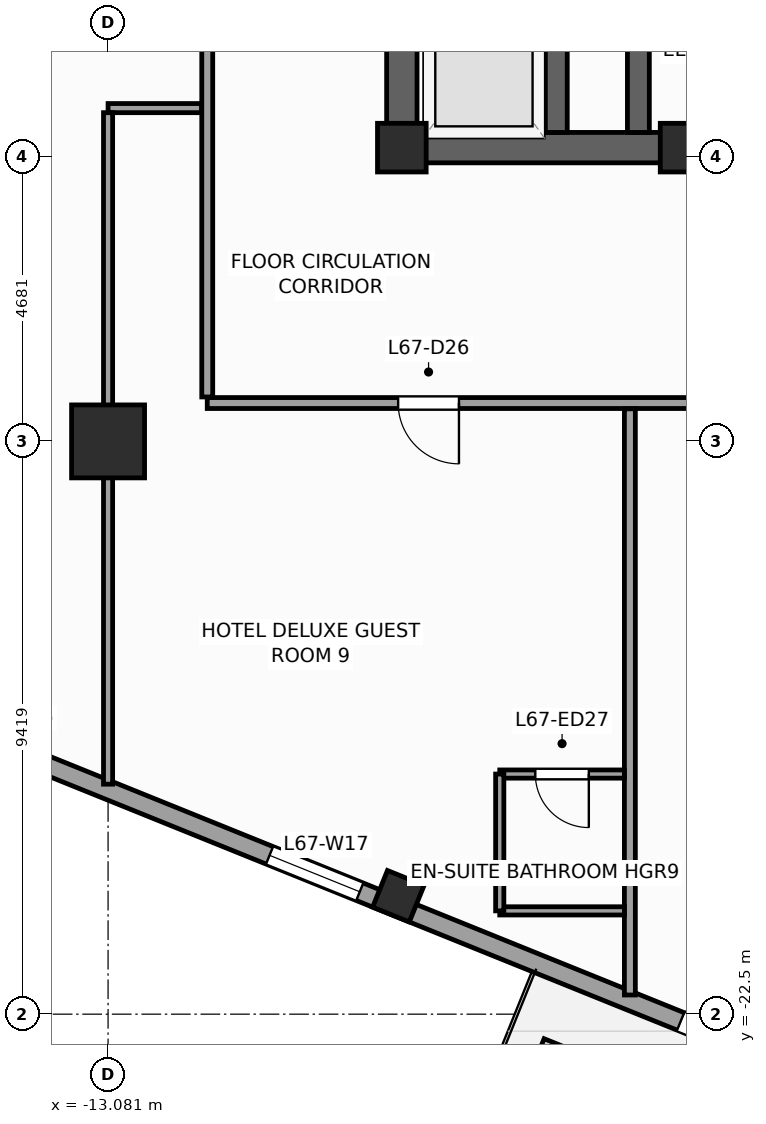
"""IFC4 building model, lengths in metres.
Left out: names, types, materials, properties, quantities, classifications, styles, units other than length and angle.
Written with IfcOpenShell. Run it as: python <this file> out.ifc"""

import sys

from ifc_helpers import new_model, si_unit, direction, frame, frame_2d, origin, origin_2d, place, context, subcontext, project, spatial, rectangle, extrude, source, transform, mapped, element, fill, save


model = new_model("IFC4")
c1 = context("Model", 3, precision=1e-05, world=origin(), true_north=direction((0.0, 1.0)))
c2 = subcontext(c1, "Body", "Model", "MODEL_VIEW")
j1 = project(units=[si_unit("LENGTHUNIT", "METRE"), si_unit("PLANEANGLEUNIT", "RADIAN")], contexts=[c1])
p1 = place(None, origin())
s1 = spatial("IfcSite", under=j1, at=p1, CompositionType="ELEMENT")
p2 = place(p1, origin())
s2 = spatial("IfcBuilding", under=s1, at=p2, CompositionType="ELEMENT")
p3 = place(p2, frame((0.0, 0.0, 276.0)))
s3 = spatial("IfcBuildingStorey", under=s2, at=p3, CompositionType="ELEMENT", Elevation=276.0)
p4 = place(p3, frame((-8.5, -8.25, 0.0), z_axis=(0.0, 0.0, 1.0), x_axis=(1.0, 0.0, 0.0)))
e1 = element("IfcWall", 1, at=p4, inside=s3, PredefinedType="SHEAR", context=c2, shape_type="SweptSolid", body=[
    extrude(rectangle(XDim=17.0, YDim=0.5, at=frame_2d((8.5, 0.0))), origin(), (0.0, 0.0, 1.0), 3.6),
])
p5 = place(p4, frame((7.85, 0.0, 0.0)))
e2 = element("IfcOpeningElement", 2, at=p5, cuts=e1, PredefinedType="OPENING", context=c2, shape_type="SweptSolid", body=[
    extrude(rectangle(XDim=1.3, YDim=2.2, at=frame_2d((0.65, 1.1))), frame((0.0, 0.26, 0.0), z_axis=(0.0, -1.0, 0.0), x_axis=(1.0, 0.0, 0.0)), (0.0, 0.0, 1.0), 0.52),
])
p6 = place(p3, frame((-8.25, -8.0, 0.0), z_axis=(0.0, 0.0, 1.0), x_axis=(0.0, 1.0, 0.0)))
e3 = element("IfcWall", 3, at=p6, inside=s3, PredefinedType="SHEAR", context=c2, shape_type="SweptSolid", body=[
    extrude(rectangle(XDim=16.0, YDim=0.5, at=frame_2d((8.0, 0.0))), origin(), (0.0, 0.0, 1.0), 3.6),
])
p7 = place(p6, frame((4.69, 0.0, 0.0)))
e4 = element("IfcOpeningElement", 4, at=p7, cuts=e3, PredefinedType="OPENING", context=c2, shape_type="SweptSolid", body=[
    extrude(rectangle(XDim=1.3, YDim=2.2, at=frame_2d((0.65, 1.1))), frame((0.0, 0.26, 0.0), z_axis=(0.0, -1.0, 0.0), x_axis=(1.0, 0.0, 0.0)), (0.0, 0.0, 1.0), 0.52),
])
p8 = place(p3, frame((-4.36, -8.0, 0.0), z_axis=(0.0, 0.0, 1.0), x_axis=(0.0, 1.0, 0.0)))
e5 = element("IfcWall", 5, at=p8, inside=s3, PredefinedType="SHEAR", context=c2, shape_type="SweptSolid", body=[
    extrude(rectangle(XDim=16.0, YDim=0.36, at=frame_2d((8.0, 0.0))), origin(), (0.0, 0.0, 1.0), 3.6),
])
p9 = place(p3, frame((-5.71, -8.0, 0.0), z_axis=(0.0, 0.0, 1.0), x_axis=(0.0, 1.0, 0.0)))
e6 = element("IfcWall", 6, at=p9, inside=s3, PredefinedType="SHEAR", context=c2, shape_type="SweptSolid", body=[
    extrude(rectangle(XDim=2.54, YDim=0.36, at=frame_2d((1.27, 0.0))), origin(), (0.0, 0.0, 1.0), 3.6),
])
m1 = source(origin(), c2, "Body", "SweptSolid", [
    extrude(rectangle(XDim=0.8, YDim=0.8, at=origin_2d()), origin(), (0.0, 0.0, 1.0), 3.6),
])
for number, where, z_axis, x_axis in (
    (7, (-8.25, -8.25, 0.0), (0.0, 0.0, 1.0), (1.0, 0.0, 0.0)),
    (8, (-3.6, -8.25, 0.0), (0.0, 0.0, 1.0), (1.0, 0.0, 0.0)),
):
    element("IfcColumn", number, at=place(p3, frame(where, z_axis=z_axis, x_axis=x_axis)), inside=s3, PredefinedType="PILASTER", context=c2, shape_type="MappedRepresentation", body=[
        mapped(m1, transform((0.0, 0.0, 0.0), scale=1.0)),
    ])
m2 = source(origin(), c2, "Body", "SweptSolid", [
    extrude(rectangle(XDim=1.2, YDim=1.2, at=origin_2d()), origin(), (0.0, 0.0, 1.0), 3.6),
])
p10 = place(p3, frame((-13.081, -13.081, 0.0), z_axis=(0.0, 0.0, 1.0), x_axis=(1.0, 0.0, 0.0)))
e9 = element("IfcColumn", 9, at=p10, inside=s3, PredefinedType="COLUMN", context=c2, shape_type="MappedRepresentation", body=[
    mapped(m2, transform((0.0, 0.0, 0.0), scale=1.0)),
])
m3 = source(origin(), c2, "Body", "SweptSolid", [
    extrude(rectangle(XDim=0.65, YDim=0.65, at=origin_2d()), origin(), (0.0, 0.0, 1.0), 3.6),
])
p11 = place(p3, frame((-8.307, -20.56, 0.0), z_axis=(0.0, 0.0, 1.0), x_axis=(0.374606593416, 0.927183854567, 0.0)))
e10 = element("IfcColumn", 10, at=p11, inside=s3, PredefinedType="COLUMN", context=c2, shape_type="MappedRepresentation", body=[
    mapped(m3, transform((0.0, 0.0, 0.0), scale=1.0)),
])
p12 = place(p3, frame((-23.813, -14.479, 0.0), z_axis=(0.0, 0.0, 1.0), x_axis=(0.927182657188, -0.374609557019, 0.0)))
e11 = element("IfcWall", 11, at=p12, inside=s3, PredefinedType="STANDARD", context=c2, shape_type="SweptSolid", body=[
    extrude(rectangle(XDim=33.31, YDim=0.31, at=frame_2d((16.655, 0.0))), origin(), (0.0, 0.0, 1.0), 2.75),
])
p13 = place(p12, frame((21.73, 0.0, 0.0)))
e12 = element("IfcOpeningElement", 12, at=p13, cuts=e11, PredefinedType="OPENING", context=c2, shape_type="SweptSolid", body=[
    extrude(rectangle(XDim=1.05, YDim=2.25, at=frame_2d((0.525, 1.125))), frame((0.0, 0.165, 0.0), z_axis=(0.0, -1.0, 0.0), x_axis=(1.0, 0.0, 0.0)), (0.0, 0.0, 1.0), 0.33),
])
p14 = place(p12, frame((3.197, 0.0, 0.47)))
e13 = element("IfcOpeningElement", 13, at=p14, cuts=e11, PredefinedType="OPENING", context=c2, shape_type="SweptSolid", body=[
    extrude(rectangle(XDim=1.6, YDim=2.1, at=frame_2d((0.8, 1.05))), frame((0.0, 0.165, 0.0), z_axis=(0.0, -1.0, 0.0), x_axis=(1.0, 0.0, 0.0)), (0.0, 0.0, 1.0), 0.33),
])
p15 = place(p12, frame((8.86, 0.0, 0.47)))
e14 = element("IfcOpeningElement", 14, at=p15, cuts=e11, PredefinedType="OPENING", context=c2, shape_type="SweptSolid", body=[
    extrude(rectangle(XDim=1.6, YDim=2.1, at=frame_2d((0.8, 1.05))), frame((0.0, 0.165, 0.0), z_axis=(0.0, -1.0, 0.0), x_axis=(1.0, 0.0, 0.0)), (0.0, 0.0, 1.0), 0.33),
])
p16 = place(p12, frame((14.439, 0.0, 0.47)))
e15 = element("IfcOpeningElement", 15, at=p16, cuts=e11, PredefinedType="OPENING", context=c2, shape_type="SweptSolid", body=[
    extrude(rectangle(XDim=1.6, YDim=2.1, at=frame_2d((0.8, 1.05))), frame((0.0, 0.165, 0.0), z_axis=(0.0, -1.0, 0.0), x_axis=(1.0, 0.0, 0.0)), (0.0, 0.0, 1.0), 0.33),
])
p17 = place(p12, frame((27.847, 0.0, 0.47)))
e16 = element("IfcOpeningElement", 16, at=p17, cuts=e11, PredefinedType="OPENING", context=c2, shape_type="SweptSolid", body=[
    extrude(rectangle(XDim=1.6, YDim=2.1, at=frame_2d((0.8, 1.05))), frame((0.0, 0.165, 0.0), z_axis=(0.0, -1.0, 0.0), x_axis=(1.0, 0.0, 0.0)), (0.0, 0.0, 1.0), 0.33),
])
p18 = place(p3, frame((-11.45, -12.45, 0.0), z_axis=(0.0, 0.0, 1.0), x_axis=(1.0, 0.0, 0.0)))
e17 = element("IfcWall", 17, at=p18, inside=s3, PredefinedType="PARTITIONING", context=c2, shape_type="SweptSolid", body=[
    extrude(rectangle(XDim=21.75, YDim=0.18, at=frame_2d((10.875, 0.0))), origin(), (0.0, 0.0, 1.0), 3.35),
])
p19 = place(p18, frame((12.436, 0.0, 0.0)))
e18 = element("IfcOpeningElement", 18, at=p19, cuts=e17, PredefinedType="OPENING", context=c2, shape_type="SweptSolid", body=[
    extrude(rectangle(XDim=0.95, YDim=2.1, at=frame_2d((0.475, 1.05))), frame((0.0, 0.1, 0.0), z_axis=(0.0, -1.0, 0.0), x_axis=(1.0, 0.0, 0.0)), (0.0, 0.0, 1.0), 0.2),
])
p20 = place(p18, frame((18.186, 0.0, 0.0)))
e19 = element("IfcOpeningElement", 19, at=p20, cuts=e17, PredefinedType="OPENING", context=c2, shape_type="SweptSolid", body=[
    extrude(rectangle(XDim=1.0, YDim=2.15, at=frame_2d((0.5, 1.075))), frame((0.0, 0.1, 0.0), z_axis=(0.0, -1.0, 0.0), x_axis=(1.0, 0.0, 0.0)), (0.0, 0.0, 1.0), 0.2),
])
p21 = place(p18, frame((14.5, 0.0, 0.0)))
e20 = element("IfcOpeningElement", 20, at=p21, cuts=e17, PredefinedType="OPENING", context=c2, shape_type="SweptSolid", body=[
    extrude(rectangle(XDim=1.0, YDim=2.15, at=frame_2d((0.5, 1.075))), frame((0.0, 0.1, 0.0), z_axis=(0.0, -1.0, 0.0), x_axis=(1.0, 0.0, 0.0)), (0.0, 0.0, 1.0), 0.2),
])
p22 = place(p18, frame((8.7, 0.0, 0.0)))
e21 = element("IfcOpeningElement", 21, at=p22, cuts=e17, PredefinedType="OPENING", context=c2, shape_type="SweptSolid", body=[
    extrude(rectangle(XDim=1.0, YDim=2.15, at=frame_2d((0.5, 1.075))), frame((0.0, 0.1, 0.0), z_axis=(0.0, -1.0, 0.0), x_axis=(1.0, 0.0, 0.0)), (0.0, 0.0, 1.0), 0.2),
])
p23 = place(p18, frame((3.139, 0.0, 0.0)))
e22 = element("IfcOpeningElement", 22, at=p23, cuts=e17, PredefinedType="OPENING", context=c2, shape_type="SweptSolid", body=[
    extrude(rectangle(XDim=1.0, YDim=2.15, at=frame_2d((0.5, 1.075))), frame((0.0, 0.1, 0.0), z_axis=(0.0, -1.0, 0.0), x_axis=(1.0, 0.0, 0.0)), (0.0, 0.0, 1.0), 0.2),
])
p24 = place(p3, frame((-11.45, -12.35, 0.0), z_axis=(0.0, 0.0, 1.0), x_axis=(0.0, 1.0, 0.0)))
e23 = element("IfcWall", 23, at=p24, inside=s3, PredefinedType="PARTITIONING", context=c2, shape_type="SweptSolid", body=[
    extrude(rectangle(XDim=23.7, YDim=0.18, at=frame_2d((11.85, 0.0))), origin(), (0.0, 0.0, 1.0), 3.35),
])
p25 = place(p24, frame((13.75, 0.0, 0.0)))
e24 = element("IfcOpeningElement", 24, at=p25, cuts=e23, PredefinedType="OPENING", context=c2, shape_type="SweptSolid", body=[
    extrude(rectangle(XDim=1.0, YDim=2.15, at=frame_2d((0.5, 1.075))), frame((0.0, 0.1, 0.0), z_axis=(0.0, -1.0, 0.0), x_axis=(1.0, 0.0, 0.0)), (0.0, 0.0, 1.0), 0.2),
])
p26 = place(p24, frame((17.55, 0.0, 0.0)))
e25 = element("IfcOpeningElement", 25, at=p26, cuts=e23, PredefinedType="OPENING", context=c2, shape_type="SweptSolid", body=[
    extrude(rectangle(XDim=1.0, YDim=2.15, at=frame_2d((0.5, 1.075))), frame((0.0, 0.1, 0.0), z_axis=(0.0, -1.0, 0.0), x_axis=(1.0, 0.0, 0.0)), (0.0, 0.0, 1.0), 0.2),
])
p27 = place(p24, frame((6.15, 0.0, 0.0)))
e26 = element("IfcOpeningElement", 26, at=p27, cuts=e23, PredefinedType="OPENING", context=c2, shape_type="SweptSolid", body=[
    extrude(rectangle(XDim=1.0, YDim=2.15, at=frame_2d((0.5, 1.075))), frame((0.0, 0.1, 0.0), z_axis=(0.0, -1.0, 0.0), x_axis=(1.0, 0.0, 0.0)), (0.0, 0.0, 1.0), 0.2),
])
p28 = place(p24, frame((9.95, 0.0, 0.0)))
e27 = element("IfcOpeningElement", 27, at=p28, cuts=e23, PredefinedType="OPENING", context=c2, shape_type="SweptSolid", body=[
    extrude(rectangle(XDim=1.0, YDim=2.15, at=frame_2d((0.5, 1.075))), frame((0.0, 0.1, 0.0), z_axis=(0.0, -1.0, 0.0), x_axis=(1.0, 0.0, 0.0)), (0.0, 0.0, 1.0), 0.2),
])
p29 = place(p3, frame((-4.5, -12.545, 0.0), z_axis=(0.0, 0.0, 1.0), x_axis=(0.0, -1.0, 0.0)))
e28 = element("IfcWall", 28, at=p29, inside=s3, PredefinedType="PARTITIONING", context=c2, shape_type="SweptSolid", body=[
    extrude(rectangle(XDim=9.64, YDim=0.18, at=frame_2d((4.82, 0.0))), origin(), (0.0, 0.0, 1.0), 3.35),
])
p30 = place(p3, frame((-11.545, -7.6, 0.0), z_axis=(0.0, 0.0, 1.0), x_axis=(-1.0, 0.0, 0.0)))
e29 = element("IfcWall", 29, at=p30, inside=s3, PredefinedType="PARTITIONING", context=c2, shape_type="SweptSolid", body=[
    extrude(rectangle(XDim=1.536, YDim=0.15, at=frame_2d((0.768, 0.0))), origin(), (0.0, 0.0, 1.0), 3.35),
])
p31 = place(p3, frame((-13.081, -7.675, 0.0), z_axis=(0.0, 0.0, 1.0), x_axis=(0.0, -1.0, 0.0)))
e30 = element("IfcWall", 30, at=p31, inside=s3, PredefinedType="PARTITIONING", context=c2, shape_type="SweptSolid", body=[
    extrude(rectangle(XDim=11.043, YDim=0.15, at=frame_2d((5.521, 0.0))), origin(), (0.0, 0.0, 1.0), 2.45),
])
p32 = place(p3, frame((-6.64, -20.801, 0.0), z_axis=(0.0, 0.0, 1.0), x_axis=(1.0, 0.0, 0.0)))
e31 = element("IfcWall", 31, at=p32, inside=s3, PredefinedType="PARTITIONING", context=c2, shape_type="SweptSolid", body=[
    extrude(rectangle(XDim=2.05, YDim=0.135, at=frame_2d((1.025, 0.0))), origin(), (0.0, 0.0, 1.0), 3.35),
])
p33 = place(p3, frame((-6.64, -18.551, 0.0), z_axis=(0.0, 0.0, 1.0), x_axis=(1.0, 0.0, 0.0)))
e32 = element("IfcWall", 32, at=p33, inside=s3, PredefinedType="PARTITIONING", context=c2, shape_type="SweptSolid", body=[
    extrude(rectangle(XDim=2.05, YDim=0.135, at=frame_2d((1.025, 0.0))), origin(), (0.0, 0.0, 1.0), 2.95),
])
p34 = place(p33, frame((0.585, 0.0, 0.0)))
e33 = element("IfcOpeningElement", 33, at=p34, cuts=e32, PredefinedType="OPENING", context=c2, shape_type="SweptSolid", body=[
    extrude(rectangle(XDim=0.88, YDim=2.1, at=frame_2d((0.44, 1.05))), frame((0.0, 0.078, 0.0), z_axis=(0.0, -1.0, 0.0), x_axis=(1.0, 0.0, 0.0)), (0.0, 0.0, 1.0), 0.155),
])
p35 = place(p3, frame((-6.64, -20.801, 0.0), z_axis=(0.0, 0.0, 1.0), x_axis=(0.0, 1.0, 0.0)))
e34 = element("IfcWall", 34, at=p35, inside=s3, PredefinedType="PARTITIONING", context=c2, shape_type="SweptSolid", body=[
    extrude(rectangle(XDim=2.25, YDim=0.135, at=frame_2d((1.125, 0.0))), origin(), (0.0, 0.0, 1.0), 3.35),
])
m4 = source(origin(), c2, "Body", "SweptSolid", [
    extrude(rectangle(XDim=1.05, YDim=2.25, at=frame_2d((0.525, 1.125))), frame((0.0, 0.025, 0.0), z_axis=(0.0, -1.0, 0.0), x_axis=(1.0, 0.0, 0.0)), (0.0, 0.0, 1.0), 0.05),
])
p36 = place(p13, origin())
e35 = element("IfcDoor", 35, at=p36, inside=s3, OperationType="SINGLE_SWING_RIGHT", PredefinedType="DOOR", context=c2, shape_type="MappedRepresentation", body=[
    mapped(m4, transform((0.0, 0.0, 0.0), scale=1.0)),
])
fill(e12, e35)
m5 = source(origin(), c2, "Body", "SweptSolid", [
    extrude(rectangle(XDim=1.6, YDim=2.1, at=frame_2d((0.8, 1.05))), frame((0.0, 0.03, 0.0), z_axis=(0.0, -1.0, 0.0), x_axis=(1.0, 0.0, 0.0)), (0.0, 0.0, 1.0), 0.06),
])
p37 = place(p16, origin())
e36 = element("IfcWindow", 36, at=p37, inside=s3, PartitioningType="SINGLE_PANEL", PredefinedType="WINDOW", context=c2, shape_type="MappedRepresentation", body=[
    mapped(m5, transform((0.0, 0.0, 0.0), scale=1.0)),
])
fill(e15, e36)
m6 = source(origin(), c2, "Body", "SweptSolid", [
    extrude(rectangle(XDim=1.0, YDim=2.15, at=frame_2d((0.5, 1.075))), frame((0.0, 0.025, 0.0), z_axis=(0.0, -1.0, 0.0), x_axis=(1.0, 0.0, 0.0)), (0.0, 0.0, 1.0), 0.05),
])
p38 = place(p23, frame((1.0, 0.0, 0.0), z_axis=(0.0, 0.0, 1.0), x_axis=(-1.0, 0.0, 0.0)))
e37 = element("IfcDoor", 37, at=p38, inside=s3, OperationType="SINGLE_SWING_RIGHT", PredefinedType="DOOR", context=c2, shape_type="MappedRepresentation", body=[
    mapped(m6, transform((0.0, 0.0, 0.0), scale=1.0)),
])
fill(e22, e37)
m7 = source(origin(), c2, "Body", "SweptSolid", [
    extrude(rectangle(XDim=0.88, YDim=2.1, at=frame_2d((0.44, 1.05))), frame((0.0, 0.025, 0.0), z_axis=(0.0, -1.0, 0.0), x_axis=(1.0, 0.0, 0.0)), (0.0, 0.0, 1.0), 0.05),
])
p39 = place(p34, frame((0.88, 0.0, 0.0), z_axis=(0.0, 0.0, 1.0), x_axis=(-1.0, 0.0, 0.0)))
e38 = element("IfcDoor", 38, at=p39, inside=s3, OperationType="SINGLE_SWING_RIGHT", PredefinedType="DOOR", context=c2, shape_type="MappedRepresentation", body=[
    mapped(m7, transform((0.0, 0.0, 0.0), scale=1.0)),
])
fill(e33, e38)
save(model, sys.argv[1])
